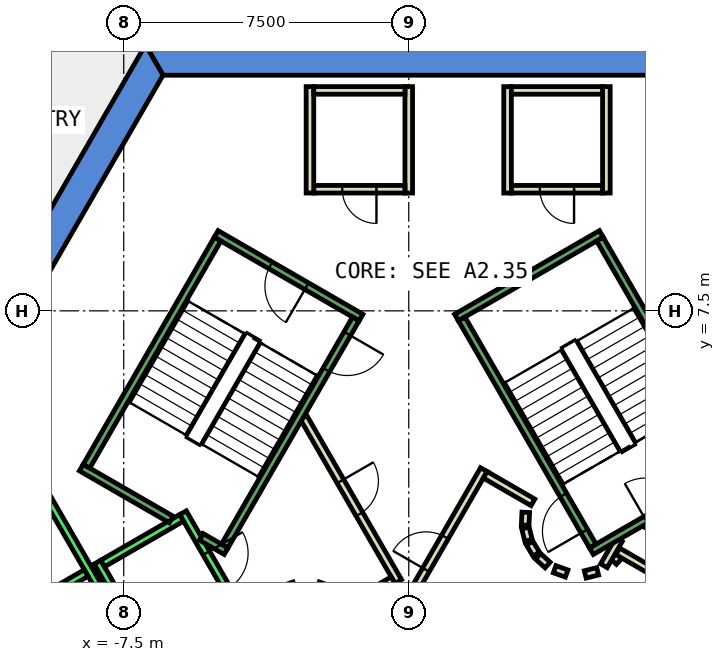
"""IFC4 building model, lengths in metres.
Left out: names, types, materials, properties, quantities, classifications, styles, units other than length and angle.
Written with IfcOpenShell. Run it as: python <this file> out.ifc"""

import sys

from ifc_helpers import new_model, si_unit, direction, frame, frame_2d, origin, place, context, subcontext, project, spatial, polyline, rectangle, outline, extrude, element, fill, save


model = new_model("IFC4")
c1 = context("Model", 3, precision=1e-05, world=origin(), true_north=direction((0.0, 1.0)))
c2 = subcontext(c1, "Body", "Model", "MODEL_VIEW")
j1 = project(units=[si_unit("LENGTHUNIT", "METRE"), si_unit("PLANEANGLEUNIT", "RADIAN")], contexts=[c1])
p1 = place(None, origin())
s1 = spatial("IfcSite", under=j1, at=p1, CompositionType="ELEMENT")
p2 = place(p1, origin())
s2 = spatial("IfcBuilding", under=s1, at=p2, CompositionType="ELEMENT")
p3 = place(p2, frame((0.0, 0.0, 171.8)))
s3 = spatial("IfcBuildingStorey", under=s2, at=p3, CompositionType="ELEMENT", Elevation=171.8)
p4 = place(p3, frame((0.0, 0.0, -0.4)))
e1 = element("IfcWall", 1, at=p4, inside=s3, PredefinedType="SHEAR", context=c2, shape_type="SweptSolid", body=[
    extrude(outline(polyline([(6.928, 14.5), (-6.928, 14.5), (-6.466, 13.7), (6.466, 13.7), (6.928, 14.5)])), origin(), (0.0, 0.0, 1.0), 4.2),
])
p5 = place(p3, frame((0.0, 0.0, -0.4)))
e2 = element("IfcWall", 2, at=p5, inside=s3, PredefinedType="SHEAR", context=c2, shape_type="SweptSolid", body=[
    extrude(outline(polyline([(-12.267, 5.252), (-11.575, 4.852), (-6.466, 13.7), (-6.928, 14.5), (-12.267, 5.252)])), origin(), (0.0, 0.0, 1.0), 4.2),
])
p6 = place(p3, frame((0.0, 0.0, -0.4)))
e3 = element("IfcWall", 3, at=p6, inside=s3, PredefinedType="SHEAR", context=c2, shape_type="SweptSolid", body=[
    extrude(outline(polyline([(-13.856, 2.5), (-6.928, -9.5), (-6.466, -8.7), (-12.933, 2.5), (-13.856, 2.5)])), origin(), (0.0, 0.0, 1.0), 4.2),
])
p7 = place(p3, frame((5.2, 13.4, 0.0), z_axis=(0.0, 0.0, 1.0), x_axis=(0.0, -1.0, 0.0)))
e4 = element("IfcWall", 4, at=p7, inside=s3, PredefinedType="PARTITIONING", context=c2, shape_type="SweptSolid", body=[
    extrude(rectangle(XDim=2.8, YDim=0.2, at=frame_2d((1.4, 0.0))), origin(), (0.0, 0.0, 1.0), 3.8),
])
p8 = place(p3, frame((5.1, 10.7, 0.0), z_axis=(0.0, 0.0, 1.0), x_axis=(-1.0, 0.0, 0.0)))
e5 = element("IfcWall", 5, at=p8, inside=s3, PredefinedType="PARTITIONING", context=c2, shape_type="SweptSolid", body=[
    extrude(rectangle(XDim=2.4, YDim=0.2, at=frame_2d((1.2, 0.0))), origin(), (0.0, 0.0, 1.0), 3.8),
])
p9 = place(p8, frame((0.75, 0.0, 0.0)))
e6 = element("IfcOpeningElement", 6, at=p9, cuts=e5, PredefinedType="OPENING", context=c2, shape_type="SweptSolid", body=[
    extrude(rectangle(XDim=0.9, YDim=2.1, at=frame_2d((0.45, 1.05))), frame((0.0, 0.11, 0.0), z_axis=(0.0, -1.0, 0.0), x_axis=(1.0, 0.0, 0.0)), (0.0, 0.0, 1.0), 0.22),
])
p10 = place(p3, frame((2.6, 10.6, 0.0), z_axis=(0.0, 0.0, 1.0), x_axis=(0.0, 1.0, 0.0)))
e7 = element("IfcWall", 7, at=p10, inside=s3, PredefinedType="PARTITIONING", context=c2, shape_type="SweptSolid", body=[
    extrude(rectangle(XDim=2.8, YDim=0.2, at=frame_2d((1.4, 0.0))), origin(), (0.0, 0.0, 1.0), 3.8),
])
p11 = place(p3, frame((2.7, 13.3, 0.0), z_axis=(0.0, 0.0, 1.0), x_axis=(1.0, 0.0, 0.0)))
e8 = element("IfcWall", 8, at=p11, inside=s3, PredefinedType="PARTITIONING", context=c2, shape_type="SweptSolid", body=[
    extrude(rectangle(XDim=2.4, YDim=0.2, at=frame_2d((1.2, 0.0))), origin(), (0.0, 0.0, 1.0), 3.8),
])
p12 = place(p3, frame((0.0, 13.4, 0.0), z_axis=(0.0, 0.0, 1.0), x_axis=(0.0, -1.0, 0.0)))
e9 = element("IfcWall", 9, at=p12, inside=s3, PredefinedType="PARTITIONING", context=c2, shape_type="SweptSolid", body=[
    extrude(rectangle(XDim=2.8, YDim=0.2, at=frame_2d((1.4, 0.0))), origin(), (0.0, 0.0, 1.0), 3.8),
])
p13 = place(p3, frame((-0.1, 10.7, 0.0), z_axis=(0.0, 0.0, 1.0), x_axis=(-1.0, 0.0, 0.0)))
e10 = element("IfcWall", 10, at=p13, inside=s3, PredefinedType="PARTITIONING", context=c2, shape_type="SweptSolid", body=[
    extrude(rectangle(XDim=2.4, YDim=0.2, at=frame_2d((1.2, 0.0))), origin(), (0.0, 0.0, 1.0), 3.8),
])
p14 = place(p13, frame((0.75, 0.0, 0.0)))
e11 = element("IfcOpeningElement", 11, at=p14, cuts=e10, PredefinedType="OPENING", context=c2, shape_type="SweptSolid", body=[
    extrude(rectangle(XDim=0.9, YDim=2.1, at=frame_2d((0.45, 1.05))), frame((0.0, 0.11, 0.0), z_axis=(0.0, -1.0, 0.0), x_axis=(1.0, 0.0, 0.0)), (0.0, 0.0, 1.0), 0.22),
])
p15 = place(p3, frame((-2.6, 10.6, 0.0), z_axis=(0.0, 0.0, 1.0), x_axis=(0.0, 1.0, 0.0)))
e12 = element("IfcWall", 12, at=p15, inside=s3, PredefinedType="PARTITIONING", context=c2, shape_type="SweptSolid", body=[
    extrude(rectangle(XDim=2.8, YDim=0.2, at=frame_2d((1.4, 0.0))), origin(), (0.0, 0.0, 1.0), 3.8),
])
p16 = place(p3, frame((-2.5, 13.3, 0.0), z_axis=(0.0, 0.0, 1.0), x_axis=(1.0, 0.0, 0.0)))
e13 = element("IfcWall", 13, at=p16, inside=s3, PredefinedType="PARTITIONING", context=c2, shape_type="SweptSolid", body=[
    extrude(rectangle(XDim=2.4, YDim=0.2, at=frame_2d((1.2, 0.0))), origin(), (0.0, 0.0, 1.0), 3.8),
])
p17 = place(p3, frame((5.39, 0.898, 0.0), z_axis=(0.0, 0.0, 1.0), x_axis=(0.673828488714, 0.738887791073, 0.0)))
e14 = element("IfcWall", 14, at=p17, inside=s3, PredefinedType="PARTITIONING", context=c2, shape_type="SweptSolid", body=[
    extrude(rectangle(XDim=0.263, YDim=0.2, at=frame_2d((0.131, 0.0))), origin(), (0.0, 0.0, 1.0), 3.8),
])
p18 = place(p3, frame((5.499, 1.172, 0.0), z_axis=(0.0, 0.0, 1.0), x_axis=(0.866333505267, -0.499465972466, 0.0)))
e15 = element("IfcWall", 15, at=p18, inside=s3, PredefinedType="PARTITIONING", context=c2, shape_type="SweptSolid", body=[
    extrude(rectangle(XDim=1.374, YDim=0.2, at=frame_2d((0.687, 0.0))), origin(), (0.0, 0.0, 1.0), 3.8),
])
p19 = place(p3, frame((6.826, 0.522, 0.0), z_axis=(0.0, 0.0, 1.0), x_axis=(-0.500016722714, -0.866015748706, 0.0)))
e16 = element("IfcWall", 16, at=p19, inside=s3, PredefinedType="PARTITIONING", context=c2, shape_type="SweptSolid", body=[
    extrude(rectangle(XDim=1.7, YDim=0.2, at=frame_2d((0.85, 0.0))), origin(), (0.0, 0.0, 1.0), 3.8),
])
p20 = place(p3, frame((6.25, 1.894, 0.0), z_axis=(0.0, 0.0, 1.0), x_axis=(0.866043184279, -0.499969202016, 0.0)))
e17 = element("IfcWall", 17, at=p20, inside=s3, PredefinedType="PARTITIONING", context=c2, shape_type="SweptSolid", body=[
    extrude(rectangle(XDim=2.084, YDim=0.2, at=frame_2d((1.042, 0.0))), origin(), (0.0, 0.0, 1.0), 3.8),
])
p21 = place(p20, frame((0.642, 0.0, 0.0)))
e18 = element("IfcOpeningElement", 18, at=p21, cuts=e17, PredefinedType="OPENING", context=c2, shape_type="SweptSolid", body=[
    extrude(rectangle(XDim=0.9, YDim=2.1, at=frame_2d((0.45, 1.05))), frame((0.0, 0.11, 0.0), z_axis=(0.0, -1.0, 0.0), x_axis=(1.0, 0.0, 0.0)), (0.0, 0.0, 1.0), 0.22),
])
p22 = place(p3, frame((5.135, 0.793, 0.0), z_axis=(0.0, 0.0, 1.0), x_axis=(0.499526442893, 0.866298639529, 0.0)))
e19 = element("IfcWall", 19, at=p22, inside=s3, PredefinedType="PARTITIONING", context=c2, shape_type="SweptSolid", body=[
    extrude(rectangle(XDim=0.791, YDim=0.2, at=frame_2d((0.396, 0.0))), origin(), (0.0, 0.0, 1.0), 3.8),
])
p23 = place(p3, frame((-0.52, -1.0, 0.0), z_axis=(0.0, 0.0, 1.0), x_axis=(0.50011622646, 0.865958290007, 0.0)))
e20 = element("IfcWall", 20, at=p23, inside=s3, PredefinedType="PARTITIONING", context=c2, shape_type="SweptSolid", body=[
    extrude(rectangle(XDim=4.991, YDim=0.2, at=frame_2d((2.496, 0.0))), origin(), (0.0, 0.0, 1.0), 3.8),
])
p24 = place(p23, frame((1.945, 0.0, 0.0)))
e21 = element("IfcOpeningElement", 21, at=p24, cuts=e20, PredefinedType="OPENING", context=c2, shape_type="SweptSolid", body=[
    extrude(rectangle(XDim=1.0, YDim=2.1, at=frame_2d((0.5, 1.05))), frame((0.0, 0.11, 0.0), z_axis=(0.0, -1.0, 0.0), x_axis=(1.0, 0.0, 0.0)), (0.0, 0.0, 1.0), 0.22),
])
p25 = place(p3, frame((2.012, 3.186, 0.0), z_axis=(0.0, 0.0, 1.0), x_axis=(0.865891012941, -0.500232699559, 0.0)))
e22 = element("IfcWall", 22, at=p25, inside=s3, PredefinedType="PARTITIONING", context=c2, shape_type="SweptSolid", body=[
    extrude(rectangle(XDim=1.449, YDim=0.2, at=frame_2d((0.725, 0.0))), origin(), (0.0, 0.0, 1.0), 3.8),
])
p26 = place(p3, frame((3.079, 2.199, 0.0), z_axis=(0.0, 0.0, 1.0), x_axis=(-0.047771483479, -0.998858290933, 0.0)))
e23 = element("IfcWall", 23, at=p26, inside=s3, PredefinedType="PARTITIONING", context=c2, shape_type="SweptSolid", body=[
    extrude(rectangle(XDim=0.337, YDim=0.2, at=frame_2d((0.169, 0.0))), origin(), (0.0, 0.0, 1.0), 3.8),
])
p27 = place(p3, frame((3.07, 1.786, 0.0), z_axis=(0.0, 0.0, 1.0), x_axis=(0.242705583207, -0.970099994784, 0.0)))
e24 = element("IfcWall", 24, at=p27, inside=s3, PredefinedType="PARTITIONING", context=c2, shape_type="SweptSolid", body=[
    extrude(rectangle(XDim=0.338, YDim=0.2, at=frame_2d((0.169, 0.0))), origin(), (0.0, 0.0, 1.0), 3.8),
])
for number, where, z_axis, x_axis in (
    (25, (3.182, 1.388, 0.0), (0.0, 0.0, 1.0), (0.512, -0.859, 0.0)),
    (26, (3.404, 1.039, 0.0), (0.0, 0.0, 1.0), (0.74, -0.672, 0.0)),
):
    element("IfcWall", number, at=place(p3, frame(where, z_axis=z_axis, x_axis=x_axis)), inside=s3, PredefinedType="PARTITIONING", context=c2, shape_type="SweptSolid", body=[
        extrude(rectangle(XDim=0.338, YDim=0.2, at=frame_2d((0.169, 0.0))), origin(), (0.0, 0.0, 1.0), 3.8),
    ])
p28 = place(p3, frame((3.838, 0.702, 0.0), z_axis=(0.0, 0.0, 1.0), x_axis=(0.941035081519, -0.338308993895, 0.0)))
e27 = element("IfcWall", 27, at=p28, inside=s3, PredefinedType="PARTITIONING", context=c2, shape_type="SweptSolid", body=[
    extrude(rectangle(XDim=0.337, YDim=0.2, at=frame_2d((0.168, 0.0))), origin(), (0.0, 0.0, 1.0), 3.8),
])
p29 = place(p3, frame((4.644, 0.564, 0.0), z_axis=(0.0, 0.0, 1.0), x_axis=(0.969929076366, 0.243387729394, 0.0)))
e28 = element("IfcWall", 28, at=p29, inside=s3, PredefinedType="PARTITIONING", context=c2, shape_type="SweptSolid", body=[
    extrude(rectangle(XDim=0.337, YDim=0.2, at=frame_2d((0.168, 0.0))), origin(), (0.0, 0.0, 1.0), 3.8),
])
p30 = place(p3, frame((-2.771, 4.7, 0.0), z_axis=(0.0, 0.0, 1.0), x_axis=(0.499969479948, -0.866043023828, 0.0)))
e29 = element("IfcWall", 29, at=p30, inside=s3, PredefinedType="PARTITIONING", context=c2, shape_type="SweptSolid", body=[
    extrude(rectangle(XDim=4.99, YDim=0.2, at=frame_2d((2.495, 0.0))), origin(), (0.0, 0.0, 1.0), 3.8),
])
p31 = place(p30, frame((1.945, 0.0, 0.0)))
e30 = element("IfcOpeningElement", 30, at=p31, cuts=e29, PredefinedType="OPENING", context=c2, shape_type="SweptSolid", body=[
    extrude(rectangle(XDim=1.0, YDim=2.1, at=frame_2d((0.5, 1.05))), frame((0.0, 0.11, 0.0), z_axis=(0.0, -1.0, 0.0), x_axis=(1.0, 0.0, 0.0)), (0.0, 0.0, 1.0), 0.22),
])
p32 = place(p3, frame((-0.412, 0.414, 0.0), z_axis=(0.0, 0.0, 1.0), x_axis=(-0.866017369001, -0.500013916395, 0.0)))
e31 = element("IfcWall", 31, at=p32, inside=s3, PredefinedType="PARTITIONING", context=c2, shape_type="SweptSolid", body=[
    extrude(rectangle(XDim=1.45, YDim=0.2, at=frame_2d((0.725, 0.0))), origin(), (0.0, 0.0, 1.0), 3.8),
])
p33 = place(p3, frame((-2.07, 0.16, 0.0), z_axis=(0.0, 0.0, 1.0), x_axis=(-0.942199461132, 0.335052496547, 0.0)))
e32 = element("IfcWall", 32, at=p33, inside=s3, PredefinedType="PARTITIONING", context=c2, shape_type="SweptSolid", body=[
    extrude(rectangle(XDim=0.337, YDim=0.2, at=frame_2d((0.169, 0.0))), origin(), (0.0, 0.0, 1.0), 3.8),
])
p34 = place(p3, frame((-3.012, 0.273, 0.0), z_axis=(0.0, 0.0, 1.0), x_axis=(-0.942280615813, -0.334824194261, 0.0)))
e33 = element("IfcWall", 33, at=p34, inside=s3, PredefinedType="PARTITIONING", context=c2, shape_type="SweptSolid", body=[
    extrude(rectangle(XDim=0.338, YDim=0.2, at=frame_2d((0.169, 0.0))), origin(), (0.0, 0.0, 1.0), 3.8),
])
p35 = place(p3, frame((-5.94, 2.188, 0.0), z_axis=(0.0, 0.0, 1.0), x_axis=(0.49994636267, -0.866056369097, 0.0)))
e34 = element("IfcWall", 34, at=p35, inside=s3, PredefinedType="STANDARD", context=c2, shape_type="SweptSolid", body=[
    extrude(rectangle(XDim=2.8, YDim=0.2, at=frame_2d((1.4, 0.0))), origin(), (0.0, 0.0, 1.0), 3.8),
])
p36 = place(p35, frame((1.225, 0.0, 0.0)))
e35 = element("IfcOpeningElement", 35, at=p36, cuts=e34, PredefinedType="OPENING", context=c2, shape_type="SweptSolid", body=[
    extrude(rectangle(XDim=1.1, YDim=2.1, at=frame_2d((0.55, 1.05))), frame((0.0, 0.11, 0.0), z_axis=(0.0, -1.0, 0.0), x_axis=(1.0, 0.0, 0.0)), (0.0, 0.0, 1.0), 0.22),
])
p37 = place(p3, frame((-8.192, 0.888, 0.0), z_axis=(0.0, 0.0, 1.0), x_axis=(0.49994636267, -0.866056369097, 0.0)))
e36 = element("IfcWall", 36, at=p37, inside=s3, PredefinedType="STANDARD", context=c2, shape_type="SweptSolid", body=[
    extrude(rectangle(XDim=2.8, YDim=0.2, at=frame_2d((1.4, 0.0))), origin(), (0.0, 0.0, 1.0), 3.8),
])
p38 = place(p3, frame((-5.977, 2.052, 0.0), z_axis=(0.0, 0.0, 1.0), x_axis=(-0.865973769406, -0.500089422704, 0.0)))
e37 = element("IfcWall", 37, at=p38, inside=s3, PredefinedType="STANDARD", context=c2, shape_type="SweptSolid", body=[
    extrude(rectangle(XDim=2.399, YDim=0.2, at=frame_2d((1.2, 0.0))), origin(), (0.0, 0.0, 1.0), 3.8),
])
p39 = place(p3, frame((-9.751, 2.99, 0.0), z_axis=(0.0, 0.0, 1.0), x_axis=(0.50000090737, -0.866024879913, 0.0)))
e38 = element("IfcWall", 38, at=p39, inside=s3, PredefinedType="STANDARD", context=c2, shape_type="SweptSolid", body=[
    extrude(rectangle(XDim=10.6, YDim=0.2, at=frame_2d((5.3, 0.0))), origin(), (0.0, 0.0, 1.0), 3.8),
])
p40 = place(p3, frame((-8.488, 0.602, 0.0), z_axis=(0.0, 0.0, 1.0), x_axis=(-0.866022959057, -0.500004234368, 0.0)))
e39 = element("IfcWall", 39, at=p40, inside=s3, PredefinedType="STANDARD", context=c2, shape_type="SweptSolid", body=[
    extrude(rectangle(XDim=2.5, YDim=0.2, at=frame_2d((1.25, 0.0))), origin(), (0.0, 0.0, 1.0), 3.8),
])
p41 = place(p3, frame((4.451, -6.19, 0.0), z_axis=(0.0, 0.0, 1.0), x_axis=(0.50000090737, 0.866024879913, 0.0)))
e40 = element("IfcWall", 40, at=p41, inside=s3, PredefinedType="STANDARD", context=c2, shape_type="SweptSolid", body=[
    extrude(rectangle(XDim=10.6, YDim=0.2, at=frame_2d((5.3, 0.0))), origin(), (0.0, 0.0, 1.0), 3.8),
])
p42 = place(p3, frame((4.806, 1.176, 0.0), z_axis=(0.0, 0.0, 1.0), x_axis=(0.866059941101, 0.499940174841, 0.0)))
e41 = element("IfcWall", 41, at=p42, inside=s3, PredefinedType="STANDARD", context=c2, shape_type="SweptSolid", body=[
    extrude(rectangle(XDim=4.4, YDim=0.2, at=frame_2d((2.2, 0.0))), origin(), (0.0, 0.0, 1.0), 3.8),
])
p43 = place(p42, frame((1.65, 0.0, 0.0)))
e42 = element("IfcOpeningElement", 42, at=p43, cuts=e41, PredefinedType="OPENING", context=c2, shape_type="SweptSolid", body=[
    extrude(rectangle(XDim=1.1, YDim=2.2, at=frame_2d((0.55, 1.1))), frame((0.0, 0.11, 0.0), z_axis=(0.0, -1.0, 0.0), x_axis=(1.0, 0.0, 0.0)), (0.0, 0.0, 1.0), 0.22),
])
p44 = place(p3, frame((1.256, 7.324, 0.0), z_axis=(0.0, 0.0, 1.0), x_axis=(0.866046073146, 0.499964197906, 0.0)))
e43 = element("IfcWall", 43, at=p44, inside=s3, PredefinedType="STANDARD", context=c2, shape_type="SweptSolid", body=[
    extrude(rectangle(XDim=4.4, YDim=0.2, at=frame_2d((2.2, 0.0))), origin(), (0.0, 0.0, 1.0), 3.8),
])
p45 = place(p3, frame((4.843, 1.312, 0.0), z_axis=(0.0, 0.0, 1.0), x_axis=(-0.499963383562, 0.866046543262, 0.0)))
e44 = element("IfcWall", 44, at=p45, inside=s3, PredefinedType="STANDARD", context=c2, shape_type="SweptSolid", body=[
    extrude(rectangle(XDim=6.9, YDim=0.2, at=frame_2d((3.45, 0.0))), origin(), (0.0, 0.0, 1.0), 3.8),
])
p46 = place(p45, frame((0.45, 0.0, 0.0)))
e45 = element("IfcOpeningElement", 45, at=p46, cuts=e44, PredefinedType="OPENING", context=c2, shape_type="SweptSolid", body=[
    extrude(rectangle(XDim=1.1, YDim=2.2, at=frame_2d((0.55, 1.1))), frame((0.0, 0.11, 0.0), z_axis=(0.0, -1.0, 0.0), x_axis=(1.0, 0.0, 0.0)), (0.0, 0.0, 1.0), 0.22),
])
p47 = place(p3, frame((8.48, 3.412, 0.0), z_axis=(0.0, 0.0, 1.0), x_axis=(-0.499978703459, 0.866037698999, 0.0)))
e46 = element("IfcWall", 46, at=p47, inside=s3, PredefinedType="STANDARD", context=c2, shape_type="SweptSolid", body=[
    extrude(rectangle(XDim=6.9, YDim=0.2, at=frame_2d((3.45, 0.0))), origin(), (0.0, 0.0, 1.0), 3.8),
])
p48 = place(p3, frame((-1.256, 7.324, 0.0), z_axis=(0.0, 0.0, 1.0), x_axis=(-0.866046073146, 0.499964197906, 0.0)))
e47 = element("IfcWall", 47, at=p48, inside=s3, PredefinedType="STANDARD", context=c2, shape_type="SweptSolid", body=[
    extrude(rectangle(XDim=4.4, YDim=0.2, at=frame_2d((2.2, 0.0))), origin(), (0.0, 0.0, 1.0), 3.8),
])
p49 = place(p48, frame((1.65, 0.0, 0.0)))
e48 = element("IfcOpeningElement", 48, at=p49, cuts=e47, PredefinedType="OPENING", context=c2, shape_type="SweptSolid", body=[
    extrude(rectangle(XDim=1.1, YDim=2.2, at=frame_2d((0.55, 1.1))), frame((0.0, 0.11, 0.0), z_axis=(0.0, -1.0, 0.0), x_axis=(1.0, 0.0, 0.0)), (0.0, 0.0, 1.0), 0.22),
])
p50 = place(p3, frame((-6.25, 2.01, 0.0), z_axis=(0.0, 0.0, 1.0), x_axis=(-0.86611865017, 0.499838457731, 0.0)))
e49 = element("IfcWall", 49, at=p50, inside=s3, PredefinedType="STANDARD", context=c2, shape_type="SweptSolid", body=[
    extrude(rectangle(XDim=2.733, YDim=0.2, at=frame_2d((1.366, 0.0))), origin(), (0.0, 0.0, 1.0), 3.8),
])
p51 = place(p3, frame((-4.806, 1.176, 0.0), z_axis=(0.0, 0.0, 1.0), x_axis=(-0.866558586415, 0.499075361355, 0.0)))
e50 = element("IfcWall", 50, at=p51, inside=s3, PredefinedType="STANDARD", context=c2, shape_type="SweptSolid", body=[
    extrude(rectangle(XDim=0.751, YDim=0.2, at=frame_2d((0.376, 0.0))), origin(), (0.0, 0.0, 1.0), 3.8),
])
p52 = place(p3, frame((-1.393, 7.288, 0.0), z_axis=(0.0, 0.0, 1.0), x_axis=(-0.499963383562, -0.866046543262, 0.0)))
e51 = element("IfcWall", 51, at=p52, inside=s3, PredefinedType="STANDARD", context=c2, shape_type="SweptSolid", body=[
    extrude(rectangle(XDim=6.9, YDim=0.2, at=frame_2d((3.45, 0.0))), origin(), (0.0, 0.0, 1.0), 3.8),
])
p53 = place(p52, frame((0.45, 0.0, 0.0)))
e52 = element("IfcOpeningElement", 52, at=p53, cuts=e51, PredefinedType="OPENING", context=c2, shape_type="SweptSolid", body=[
    extrude(rectangle(XDim=1.1, YDim=2.2, at=frame_2d((0.55, 1.1))), frame((0.0, 0.11, 0.0), z_axis=(0.0, -1.0, 0.0), x_axis=(1.0, 0.0, 0.0)), (0.0, 0.0, 1.0), 0.22),
])
p54 = place(p3, frame((-5.03, 9.388, 0.0), z_axis=(0.0, 0.0, 1.0), x_axis=(-0.499978703459, -0.866037698999, 0.0)))
e53 = element("IfcWall", 53, at=p54, inside=s3, PredefinedType="STANDARD", context=c2, shape_type="SweptSolid", body=[
    extrude(rectangle(XDim=6.9, YDim=0.2, at=frame_2d((3.45, 0.0))), origin(), (0.0, 0.0, 1.0), 3.8),
])
p55 = place(p24, origin())
e54 = element("IfcDoor", 54, at=p55, inside=s3, OperationType="SINGLE_SWING_LEFT", PredefinedType="DOOR", context=c2, shape_type="SweptSolid", body=[
    extrude(rectangle(XDim=1.0, YDim=2.1, at=frame_2d((0.5, 1.05))), frame((0.0, 0.025, 0.0), z_axis=(0.0, -1.0, 0.0), x_axis=(1.0, 0.0, 0.0)), (0.0, 0.0, 1.0), 0.05),
])
fill(e21, e54)
p56 = place(p31, origin())
e55 = element("IfcDoor", 55, at=p56, inside=s3, OperationType="SINGLE_SWING_RIGHT", PredefinedType="DOOR", context=c2, shape_type="SweptSolid", body=[
    extrude(rectangle(XDim=1.0, YDim=2.1, at=frame_2d((0.5, 1.05))), frame((0.0, 0.025, 0.0), z_axis=(0.0, -1.0, 0.0), x_axis=(1.0, 0.0, 0.0)), (0.0, 0.0, 1.0), 0.05),
])
fill(e30, e55)
p57 = place(p9, origin())
e56 = element("IfcDoor", 56, at=p57, inside=s3, OperationType="SINGLE_SWING_RIGHT", PredefinedType="DOOR", context=c2, shape_type="SweptSolid", body=[
    extrude(rectangle(XDim=0.9, YDim=2.1, at=frame_2d((0.45, 1.05))), frame((0.0, 0.025, 0.0), z_axis=(0.0, -1.0, 0.0), x_axis=(1.0, 0.0, 0.0)), (0.0, 0.0, 1.0), 0.05),
])
fill(e6, e56)
p58 = place(p14, origin())
e57 = element("IfcDoor", 57, at=p58, inside=s3, OperationType="SINGLE_SWING_RIGHT", PredefinedType="DOOR", context=c2, shape_type="SweptSolid", body=[
    extrude(rectangle(XDim=0.9, YDim=2.1, at=frame_2d((0.45, 1.05))), frame((0.0, 0.025, 0.0), z_axis=(0.0, -1.0, 0.0), x_axis=(1.0, 0.0, 0.0)), (0.0, 0.0, 1.0), 0.05),
])
fill(e11, e57)
p59 = place(p36, origin())
e58 = element("IfcDoor", 58, at=p59, inside=s3, OperationType="SLIDING_TO_LEFT", PredefinedType="DOOR", context=c2, shape_type="SweptSolid", body=[
    extrude(rectangle(XDim=1.1, YDim=2.1, at=frame_2d((0.55, 1.05))), frame((0.0, 0.025, 0.0), z_axis=(0.0, -1.0, 0.0), x_axis=(1.0, 0.0, 0.0)), (0.0, 0.0, 1.0), 0.05),
])
fill(e35, e58)
p60 = place(p46, origin())
e59 = element("IfcDoor", 59, at=p60, inside=s3, OperationType="SINGLE_SWING_LEFT", PredefinedType="DOOR", context=c2, shape_type="SweptSolid", body=[
    extrude(rectangle(XDim=1.1, YDim=2.2, at=frame_2d((0.55, 1.1))), frame((0.0, 0.025, 0.0), z_axis=(0.0, -1.0, 0.0), x_axis=(1.0, 0.0, 0.0)), (0.0, 0.0, 1.0), 0.05),
])
fill(e45, e59)
p61 = place(p53, origin())
e60 = element("IfcDoor", 60, at=p61, inside=s3, OperationType="SINGLE_SWING_LEFT", PredefinedType="DOOR", context=c2, shape_type="SweptSolid", body=[
    extrude(rectangle(XDim=1.1, YDim=2.2, at=frame_2d((0.55, 1.1))), frame((0.0, 0.025, 0.0), z_axis=(0.0, -1.0, 0.0), x_axis=(1.0, 0.0, 0.0)), (0.0, 0.0, 1.0), 0.05),
])
fill(e52, e60)
p62 = place(p49, origin())
e61 = element("IfcDoor", 61, at=p62, inside=s3, OperationType="SINGLE_SWING_LEFT", PredefinedType="DOOR", context=c2, shape_type="SweptSolid", body=[
    extrude(rectangle(XDim=1.1, YDim=2.2, at=frame_2d((0.55, 1.1))), frame((0.0, 0.025, 0.0), z_axis=(0.0, -1.0, 0.0), x_axis=(1.0, 0.0, 0.0)), (0.0, 0.0, 1.0), 0.05),
])
fill(e48, e61)
save(model, sys.argv[1])
